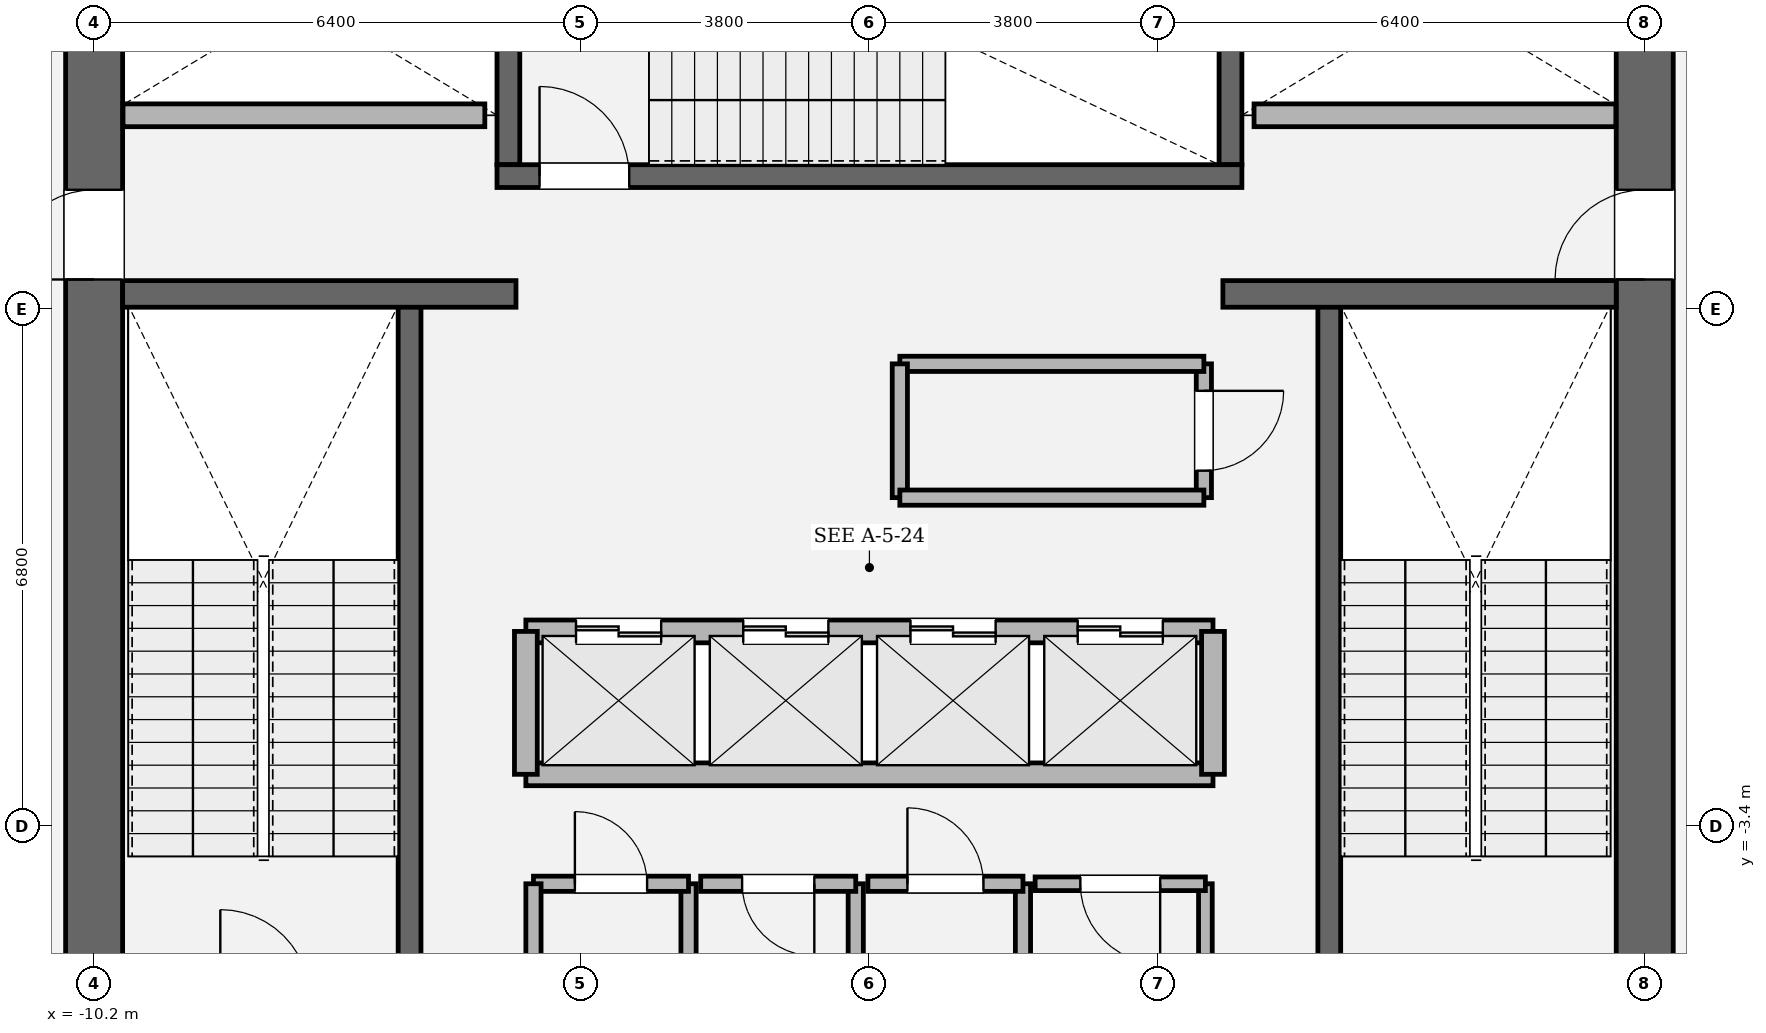
"""IFC4 building model, lengths in metres.
Left out: names, types, materials, properties, quantities, classifications, styles, units other than length and angle.
Written with IfcOpenShell. Run it as: python <this file> out.ifc"""

import sys

from ifc_helpers import new_model, si_unit, direction, frame, frame_2d, origin, place, context, subcontext, project, spatial, rectangle, extrude, element, fill, save


model = new_model("IFC4")
c1 = context("Model", 3, precision=1e-05, world=origin(), true_north=direction((0.0, 1.0)))
c2 = subcontext(c1, "Body", "Model", "MODEL_VIEW")
j1 = project(units=[si_unit("LENGTHUNIT", "METRE"), si_unit("PLANEANGLEUNIT", "RADIAN")], contexts=[c1])
p1 = place(None, origin())
s1 = spatial("IfcSite", under=j1, at=p1, CompositionType="ELEMENT")
p2 = place(p1, origin())
s2 = spatial("IfcBuilding", under=s1, at=p2, CompositionType="ELEMENT")
p3 = place(p2, frame((0.0, 0.0, 117.3)))
s3 = spatial("IfcBuildingStorey", under=s2, at=p3, CompositionType="ELEMENT", Elevation=117.3)
p4 = place(p3, frame((-10.2, -8.825, 0.0), z_axis=(0.0, 0.0, 1.0), x_axis=(0.0, 1.0, 0.0)))
e1 = element("IfcWall", 1, at=p4, inside=s3, PredefinedType="SHEAR", context=c2, shape_type="SweptSolid", body=[
    extrude(rectangle(XDim=17.65, YDim=0.75, at=frame_2d((8.825, 0.0))), origin(), (0.0, 0.0, 1.0), 4.05),
])
p5 = place(p4, frame((12.615, 0.0, 0.0)))
e2 = element("IfcOpeningElement", 2, at=p5, cuts=e1, PredefinedType="OPENING", context=c2, shape_type="SweptSolid", body=[
    extrude(rectangle(XDim=1.18, YDim=2.2, at=frame_2d((0.59, 1.1))), frame((0.0, 0.385, 0.0), z_axis=(0.0, -1.0, 0.0), x_axis=(1.0, 0.0, 0.0)), (0.0, 0.0, 1.0), 0.77),
])
p6 = place(p3, frame((10.2, 8.825, 0.0), z_axis=(0.0, 0.0, 1.0), x_axis=(0.0, -1.0, 0.0)))
e3 = element("IfcWall", 3, at=p6, inside=s3, PredefinedType="SHEAR", context=c2, shape_type="SweptSolid", body=[
    extrude(rectangle(XDim=17.65, YDim=0.75, at=frame_2d((8.825, 0.0))), origin(), (0.0, 0.0, 1.0), 4.05),
])
p7 = place(p6, frame((3.855, 0.0, 0.0)))
e4 = element("IfcOpeningElement", 4, at=p7, cuts=e3, PredefinedType="OPENING", context=c2, shape_type="SweptSolid", body=[
    extrude(rectangle(XDim=1.18, YDim=2.2, at=frame_2d((0.59, 1.1))), frame((0.0, 0.385, 0.0), z_axis=(0.0, -1.0, 0.0), x_axis=(1.0, 0.0, 0.0)), (0.0, 0.0, 1.0), 0.77),
])
for number, where, z_axis, x_axis in (
    (5, (-6.05, -5.5, 0.0), (0.0, 0.0, 1.0), (0.0, 1.0, 0.0)),
    (6, (6.05, 3.45, 0.0), (0.0, 0.0, 1.0), (0.0, -1.0, 0.0)),
):
    element("IfcWall", number, at=place(p3, frame(where, z_axis=z_axis, x_axis=x_axis)), inside=s3, PredefinedType="SOLIDWALL", context=c2, shape_type="SweptSolid", body=[
        extrude(rectangle(XDim=8.95, YDim=0.3, at=frame_2d((4.475, 0.0))), origin(), (0.0, 0.0, 1.0), 4.05),
    ])
for number, where, z_axis, x_axis in (
    (7, (-4.75, 5.3, 0.0), (0.0, 0.0, 1.0), (0.0, 1.0, 0.0)),
    (8, (4.75, 8.825, 0.0), (0.0, 0.0, 1.0), (0.0, -1.0, 0.0)),
):
    element("IfcWall", number, at=place(p3, frame(where, z_axis=z_axis, x_axis=x_axis)), inside=s3, PredefinedType="SOLIDWALL", context=c2, shape_type="SweptSolid", body=[
        extrude(rectangle(XDim=3.525, YDim=0.3, at=frame_2d((1.762, 0.0))), origin(), (0.0, 0.0, 1.0), 4.05),
    ])
p8 = place(p3, frame((-4.9, 5.15, 0.0), z_axis=(0.0, 0.0, 1.0), x_axis=(1.0, 0.0, 0.0)))
e9 = element("IfcWall", 9, at=p8, inside=s3, PredefinedType="SOLIDWALL", context=c2, shape_type="SweptSolid", body=[
    extrude(rectangle(XDim=9.8, YDim=0.3, at=frame_2d((4.9, 0.0))), origin(), (0.0, 0.0, 1.0), 4.05),
])
p9 = place(p8, frame((0.56, 0.0, 0.0)))
e10 = element("IfcOpeningElement", 10, at=p9, cuts=e9, PredefinedType="OPENING", context=c2, shape_type="SweptSolid", body=[
    extrude(rectangle(XDim=1.18, YDim=2.2, at=frame_2d((0.59, 1.1))), frame((0.0, 0.16, 0.0), z_axis=(0.0, -1.0, 0.0), x_axis=(1.0, 0.0, 0.0)), (0.0, 0.0, 1.0), 0.32),
])
for number, where, z_axis, x_axis in (
    (11, (-9.825, 3.6, 0.0), (0.0, 0.0, 1.0), (1.0, 0.0, 0.0)),
    (12, (4.65, 3.6, 0.0), (0.0, 0.0, 1.0), (1.0, 0.0, 0.0)),
):
    element("IfcWall", number, at=place(p3, frame(where, z_axis=z_axis, x_axis=x_axis)), inside=s3, PredefinedType="SOLIDWALL", context=c2, shape_type="SweptSolid", body=[
        extrude(rectangle(XDim=5.175, YDim=0.35, at=frame_2d((2.587, 0.0))), origin(), (0.0, 0.0, 1.0), 4.05),
    ])
p10 = place(p3, frame((-4.52, -0.84, 0.0), z_axis=(0.0, 0.0, 1.0), x_axis=(1.0, 0.0, 0.0)))
e13 = element("IfcWall", 13, at=p10, inside=s3, PredefinedType="SOLIDWALL", context=c2, shape_type="SweptSolid", body=[
    extrude(rectangle(XDim=9.04, YDim=0.3, at=frame_2d((4.52, 0.0))), origin(), (0.0, 0.0, 1.0), 3.81),
])
p11 = place(p10, frame((0.66, 0.0, 0.0)))
e14 = element("IfcOpeningElement", 14, at=p11, cuts=e13, PredefinedType="OPENING", context=c2, shape_type="SweptSolid", body=[
    extrude(rectangle(XDim=1.12, YDim=2.25, at=frame_2d((0.56, 1.125))), frame((0.0, 0.16, 0.0), z_axis=(0.0, -1.0, 0.0), x_axis=(1.0, 0.0, 0.0)), (0.0, 0.0, 1.0), 0.32),
])
p12 = place(p10, frame((2.86, 0.0, 0.0)))
e15 = element("IfcOpeningElement", 15, at=p12, cuts=e13, PredefinedType="OPENING", context=c2, shape_type="SweptSolid", body=[
    extrude(rectangle(XDim=1.12, YDim=2.25, at=frame_2d((0.56, 1.125))), frame((0.0, 0.16, 0.0), z_axis=(0.0, -1.0, 0.0), x_axis=(1.0, 0.0, 0.0)), (0.0, 0.0, 1.0), 0.32),
])
p13 = place(p10, frame((5.06, 0.0, 0.0)))
e16 = element("IfcOpeningElement", 16, at=p13, cuts=e13, PredefinedType="OPENING", context=c2, shape_type="SweptSolid", body=[
    extrude(rectangle(XDim=1.12, YDim=2.25, at=frame_2d((0.56, 1.125))), frame((0.0, 0.16, 0.0), z_axis=(0.0, -1.0, 0.0), x_axis=(1.0, 0.0, 0.0)), (0.0, 0.0, 1.0), 0.32),
])
p14 = place(p10, frame((7.26, 0.0, 0.0)))
e17 = element("IfcOpeningElement", 17, at=p14, cuts=e13, PredefinedType="OPENING", context=c2, shape_type="SweptSolid", body=[
    extrude(rectangle(XDim=1.12, YDim=2.25, at=frame_2d((0.56, 1.125))), frame((0.0, 0.16, 0.0), z_axis=(0.0, -1.0, 0.0), x_axis=(1.0, 0.0, 0.0)), (0.0, 0.0, 1.0), 0.32),
])
p15 = place(p3, frame((-4.52, -2.72, 0.0), z_axis=(0.0, 0.0, 1.0), x_axis=(1.0, 0.0, 0.0)))
e18 = element("IfcWall", 18, at=p15, inside=s3, PredefinedType="SOLIDWALL", context=c2, shape_type="SweptSolid", body=[
    extrude(rectangle(XDim=9.04, YDim=0.3, at=frame_2d((4.52, 0.0))), origin(), (0.0, 0.0, 1.0), 3.81),
])
for number, where, z_axis, x_axis in (
    (19, (-4.52, -2.72, 0.0), (0.0, 0.0, 1.0), (0.0, 1.0, 0.0)),
    (20, (4.52, -2.72, 0.0), (0.0, 0.0, 1.0), (0.0, 1.0, 0.0)),
):
    element("IfcWall", number, at=place(p3, frame(where, z_axis=z_axis, x_axis=x_axis)), inside=s3, PredefinedType="SOLIDWALL", context=c2, shape_type="SweptSolid", body=[
        extrude(rectangle(XDim=1.88, YDim=0.3, at=frame_2d((0.94, 0.0))), origin(), (0.0, 0.0, 1.0), 3.81),
    ])
for number, where, z_axis, x_axis in (
    (21, (-9.82, 5.95, 0.0), (0.0, 0.0, 1.0), (1.0, 0.0, 0.0)),
    (22, (5.06, 5.95, 0.0), (0.0, 0.0, 1.0), (1.0, 0.0, 0.0)),
):
    element("IfcWall", number, at=place(p3, frame(where, z_axis=z_axis, x_axis=x_axis)), inside=s3, PredefinedType="SOLIDWALL", context=c2, shape_type="SweptSolid", body=[
        extrude(rectangle(XDim=4.76, YDim=0.3, at=frame_2d((2.38, 0.0))), origin(), (0.0, 0.0, 1.0), 3.81),
    ])
p16 = place(p3, frame((-2.38, -5.9, 0.0), z_axis=(0.0, 0.0, 1.0), x_axis=(0.0, 1.0, 0.0)))
e23 = element("IfcWall", 23, at=p16, inside=s3, PredefinedType="SOLIDWALL", context=c2, shape_type="SweptSolid", body=[
    extrude(rectangle(XDim=1.74, YDim=0.2, at=frame_2d((0.87, 0.0))), origin(), (0.0, 0.0, 1.0), 3.81),
])
p17 = place(p3, frame((-2.38, -4.16, 0.0), z_axis=(0.0, 0.0, 1.0), x_axis=(-1.0, 0.0, 0.0)))
e24 = element("IfcWall", 24, at=p17, inside=s3, PredefinedType="SOLIDWALL", context=c2, shape_type="SweptSolid", body=[
    extrude(rectangle(XDim=2.04, YDim=0.2, at=frame_2d((1.02, 0.0))), origin(), (0.0, 0.0, 1.0), 3.81),
])
p18 = place(p17, frame((0.545, 0.0, 0.0)))
e25 = element("IfcOpeningElement", 25, at=p18, cuts=e24, PredefinedType="OPENING", context=c2, shape_type="SweptSolid", body=[
    extrude(rectangle(XDim=0.95, YDim=2.15, at=frame_2d((0.475, 1.075))), frame((0.0, 0.11, 0.0), z_axis=(0.0, -1.0, 0.0), x_axis=(1.0, 0.0, 0.0)), (0.0, 0.0, 1.0), 0.22),
])
for number, where, z_axis, x_axis in (
    (26, (-4.42, -4.16, 0.0), (0.0, 0.0, 1.0), (0.0, -1.0, 0.0)),
    (27, (-0.18, -5.9, 0.0), (0.0, 0.0, 1.0), (0.0, 1.0, 0.0)),
):
    element("IfcWall", number, at=place(p3, frame(where, z_axis=z_axis, x_axis=x_axis)), inside=s3, PredefinedType="SOLIDWALL", context=c2, shape_type="SweptSolid", body=[
        extrude(rectangle(XDim=1.74, YDim=0.2, at=frame_2d((0.87, 0.0))), origin(), (0.0, 0.0, 1.0), 3.81),
    ])
p19 = place(p3, frame((-0.18, -4.16, 0.0), z_axis=(0.0, 0.0, 1.0), x_axis=(-1.0, 0.0, 0.0)))
e28 = element("IfcWall", 28, at=p19, inside=s3, PredefinedType="SOLIDWALL", context=c2, shape_type="SweptSolid", body=[
    extrude(rectangle(XDim=2.04, YDim=0.2, at=frame_2d((1.02, 0.0))), origin(), (0.0, 0.0, 1.0), 3.81),
])
p20 = place(p19, frame((0.545, 0.0, 0.0)))
e29 = element("IfcOpeningElement", 29, at=p20, cuts=e28, PredefinedType="OPENING", context=c2, shape_type="SweptSolid", body=[
    extrude(rectangle(XDim=0.95, YDim=2.15, at=frame_2d((0.475, 1.075))), frame((0.0, 0.11, 0.0), z_axis=(0.0, -1.0, 0.0), x_axis=(1.0, 0.0, 0.0)), (0.0, 0.0, 1.0), 0.22),
])
p21 = place(p3, frame((2.02, -5.9, 0.0), z_axis=(0.0, 0.0, 1.0), x_axis=(0.0, 1.0, 0.0)))
e30 = element("IfcWall", 30, at=p21, inside=s3, PredefinedType="SOLIDWALL", context=c2, shape_type="SweptSolid", body=[
    extrude(rectangle(XDim=1.74, YDim=0.2, at=frame_2d((0.87, 0.0))), origin(), (0.0, 0.0, 1.0), 3.81),
])
p22 = place(p3, frame((2.02, -4.16, 0.0), z_axis=(0.0, 0.0, 1.0), x_axis=(-1.0, 0.0, 0.0)))
e31 = element("IfcWall", 31, at=p22, inside=s3, PredefinedType="SOLIDWALL", context=c2, shape_type="SweptSolid", body=[
    extrude(rectangle(XDim=2.04, YDim=0.2, at=frame_2d((1.02, 0.0))), origin(), (0.0, 0.0, 1.0), 3.81),
])
p23 = place(p22, frame((0.52, 0.0, 0.0)))
e32 = element("IfcOpeningElement", 32, at=p23, cuts=e31, PredefinedType="OPENING", context=c2, shape_type="SweptSolid", body=[
    extrude(rectangle(XDim=1.0, YDim=2.15, at=frame_2d((0.5, 1.075))), frame((0.0, 0.11, 0.0), z_axis=(0.0, -1.0, 0.0), x_axis=(1.0, 0.0, 0.0)), (0.0, 0.0, 1.0), 0.22),
])
p24 = place(p3, frame((4.42, -5.9, 0.0), z_axis=(0.0, 0.0, 1.0), x_axis=(0.0, 1.0, 0.0)))
e33 = element("IfcWall", 33, at=p24, inside=s3, PredefinedType="PARTITIONING", context=c2, shape_type="SweptSolid", body=[
    extrude(rectangle(XDim=1.74, YDim=0.18, at=frame_2d((0.87, 0.0))), origin(), (0.0, 0.0, 1.0), 3.81),
])
p25 = place(p3, frame((4.42, -4.16, 0.0), z_axis=(0.0, 0.0, 1.0), x_axis=(-1.0, 0.0, 0.0)))
e34 = element("IfcWall", 34, at=p25, inside=s3, PredefinedType="PARTITIONING", context=c2, shape_type="SweptSolid", body=[
    extrude(rectangle(XDim=2.24, YDim=0.18, at=frame_2d((1.12, 0.0))), origin(), (0.0, 0.0, 1.0), 3.81),
])
p26 = place(p25, frame((0.595, 0.0, 0.0)))
e35 = element("IfcOpeningElement", 35, at=p26, cuts=e34, PredefinedType="OPENING", context=c2, shape_type="SweptSolid", body=[
    extrude(rectangle(XDim=1.05, YDim=2.2, at=frame_2d((0.525, 1.1))), frame((0.0, 0.1, 0.0), z_axis=(0.0, -1.0, 0.0), x_axis=(1.0, 0.0, 0.0)), (0.0, 0.0, 1.0), 0.2),
])
p27 = place(p3, frame((4.4, 0.92, 0.0), z_axis=(0.0, 0.0, 1.0), x_axis=(0.0, 1.0, 0.0)))
e36 = element("IfcWall", 36, at=p27, inside=s3, PredefinedType="SOLIDWALL", context=c2, shape_type="SweptSolid", body=[
    extrude(rectangle(XDim=1.76, YDim=0.2, at=frame_2d((0.88, 0.0))), origin(), (0.0, 0.0, 1.0), 3.81),
])
p28 = place(p27, frame((0.355, 0.0, 0.0)))
e37 = element("IfcOpeningElement", 37, at=p28, cuts=e36, PredefinedType="OPENING", context=c2, shape_type="SweptSolid", body=[
    extrude(rectangle(XDim=1.05, YDim=2.2, at=frame_2d((0.525, 1.1))), frame((0.0, 0.11, 0.0), z_axis=(0.0, -1.0, 0.0), x_axis=(1.0, 0.0, 0.0)), (0.0, 0.0, 1.0), 0.22),
])
p29 = place(p3, frame((4.4, 2.68, 0.0), z_axis=(0.0, 0.0, 1.0), x_axis=(-1.0, 0.0, 0.0)))
e38 = element("IfcWall", 38, at=p29, inside=s3, PredefinedType="SOLIDWALL", context=c2, shape_type="SweptSolid", body=[
    extrude(rectangle(XDim=4.0, YDim=0.2, at=frame_2d((2.0, 0.0))), origin(), (0.0, 0.0, 1.0), 3.81),
])
p30 = place(p3, frame((0.4, 2.68, 0.0), z_axis=(0.0, 0.0, 1.0), x_axis=(0.0, -1.0, 0.0)))
e39 = element("IfcWall", 39, at=p30, inside=s3, PredefinedType="SOLIDWALL", context=c2, shape_type="SweptSolid", body=[
    extrude(rectangle(XDim=1.76, YDim=0.2, at=frame_2d((0.88, 0.0))), origin(), (0.0, 0.0, 1.0), 3.81),
])
p31 = place(p3, frame((0.4, 0.92, 0.0), z_axis=(0.0, 0.0, 1.0), x_axis=(1.0, 0.0, 0.0)))
e40 = element("IfcWall", 40, at=p31, inside=s3, PredefinedType="SOLIDWALL", context=c2, shape_type="SweptSolid", body=[
    extrude(rectangle(XDim=4.0, YDim=0.2, at=frame_2d((2.0, 0.0))), origin(), (0.0, 0.0, 1.0), 3.81),
])
p32 = place(p9, origin())
e41 = element("IfcDoor", 41, at=p32, inside=s3, OperationType="SINGLE_SWING_LEFT", PredefinedType="DOOR", context=c2, shape_type="SweptSolid", body=[
    extrude(rectangle(XDim=1.18, YDim=2.2, at=frame_2d((0.59, 1.1))), frame((0.0, 0.025, 0.0), z_axis=(0.0, -1.0, 0.0), x_axis=(1.0, 0.0, 0.0)), (0.0, 0.0, 1.0), 0.05),
])
fill(e10, e41)
p33 = place(p5, origin())
e42 = element("IfcDoor", 42, at=p33, inside=s3, OperationType="SINGLE_SWING_LEFT", PredefinedType="DOOR", context=c2, shape_type="SweptSolid", body=[
    extrude(rectangle(XDim=1.18, YDim=2.2, at=frame_2d((0.59, 1.1))), frame((0.0, 0.025, 0.0), z_axis=(0.0, -1.0, 0.0), x_axis=(1.0, 0.0, 0.0)), (0.0, 0.0, 1.0), 0.05),
])
fill(e2, e42)
p34 = place(p7, origin())
e43 = element("IfcDoor", 43, at=p34, inside=s3, OperationType="SINGLE_SWING_RIGHT", PredefinedType="DOOR", context=c2, shape_type="SweptSolid", body=[
    extrude(rectangle(XDim=1.18, YDim=2.2, at=frame_2d((0.59, 1.1))), frame((0.0, 0.025, 0.0), z_axis=(0.0, -1.0, 0.0), x_axis=(1.0, 0.0, 0.0)), (0.0, 0.0, 1.0), 0.05),
])
fill(e4, e43)
p35 = place(p11, origin())
e44 = element("IfcDoor", 44, at=p35, inside=s3, OperationType="DOUBLE_DOOR_SLIDING", PredefinedType="DOOR", context=c2, shape_type="SweptSolid", body=[
    extrude(rectangle(XDim=1.12, YDim=2.25, at=frame_2d((0.56, 1.125))), frame((0.0, 0.025, 0.0), z_axis=(0.0, -1.0, 0.0), x_axis=(1.0, 0.0, 0.0)), (0.0, 0.0, 1.0), 0.05),
])
fill(e14, e44)
p36 = place(p12, origin())
e45 = element("IfcDoor", 45, at=p36, inside=s3, OperationType="DOUBLE_DOOR_SLIDING", PredefinedType="DOOR", context=c2, shape_type="SweptSolid", body=[
    extrude(rectangle(XDim=1.12, YDim=2.25, at=frame_2d((0.56, 1.125))), frame((0.0, 0.025, 0.0), z_axis=(0.0, -1.0, 0.0), x_axis=(1.0, 0.0, 0.0)), (0.0, 0.0, 1.0), 0.05),
])
fill(e15, e45)
p37 = place(p13, origin())
e46 = element("IfcDoor", 46, at=p37, inside=s3, OperationType="DOUBLE_DOOR_SLIDING", PredefinedType="DOOR", context=c2, shape_type="SweptSolid", body=[
    extrude(rectangle(XDim=1.12, YDim=2.25, at=frame_2d((0.56, 1.125))), frame((0.0, 0.025, 0.0), z_axis=(0.0, -1.0, 0.0), x_axis=(1.0, 0.0, 0.0)), (0.0, 0.0, 1.0), 0.05),
])
fill(e16, e46)
p38 = place(p14, origin())
e47 = element("IfcDoor", 47, at=p38, inside=s3, OperationType="DOUBLE_DOOR_SLIDING", PredefinedType="DOOR", context=c2, shape_type="SweptSolid", body=[
    extrude(rectangle(XDim=1.12, YDim=2.25, at=frame_2d((0.56, 1.125))), frame((0.0, 0.025, 0.0), z_axis=(0.0, -1.0, 0.0), x_axis=(1.0, 0.0, 0.0)), (0.0, 0.0, 1.0), 0.05),
])
fill(e17, e47)
p39 = place(p18, origin())
e48 = element("IfcDoor", 48, at=p39, inside=s3, OperationType="SINGLE_SWING_RIGHT", PredefinedType="DOOR", context=c2, shape_type="SweptSolid", body=[
    extrude(rectangle(XDim=0.95, YDim=2.15, at=frame_2d((0.475, 1.075))), frame((0.0, 0.025, 0.0), z_axis=(0.0, -1.0, 0.0), x_axis=(1.0, 0.0, 0.0)), (0.0, 0.0, 1.0), 0.05),
])
fill(e25, e48)
p40 = place(p20, origin())
e49 = element("IfcDoor", 49, at=p40, inside=s3, OperationType="SINGLE_SWING_LEFT", PredefinedType="DOOR", context=c2, shape_type="SweptSolid", body=[
    extrude(rectangle(XDim=0.95, YDim=2.15, at=frame_2d((0.475, 1.075))), frame((0.0, 0.025, 0.0), z_axis=(0.0, -1.0, 0.0), x_axis=(1.0, 0.0, 0.0)), (0.0, 0.0, 1.0), 0.05),
])
fill(e29, e49)
p41 = place(p23, origin())
e50 = element("IfcDoor", 50, at=p41, inside=s3, OperationType="SINGLE_SWING_RIGHT", PredefinedType="DOOR", context=c2, shape_type="SweptSolid", body=[
    extrude(rectangle(XDim=1.0, YDim=2.15, at=frame_2d((0.5, 1.075))), frame((0.0, 0.025, 0.0), z_axis=(0.0, -1.0, 0.0), x_axis=(1.0, 0.0, 0.0)), (0.0, 0.0, 1.0), 0.05),
])
fill(e32, e50)
p42 = place(p26, origin())
e51 = element("IfcDoor", 51, at=p42, inside=s3, OperationType="SINGLE_SWING_LEFT", PredefinedType="DOOR", context=c2, shape_type="SweptSolid", body=[
    extrude(rectangle(XDim=1.05, YDim=2.2, at=frame_2d((0.525, 1.1))), frame((0.0, 0.025, 0.0), z_axis=(0.0, -1.0, 0.0), x_axis=(1.0, 0.0, 0.0)), (0.0, 0.0, 1.0), 0.05),
])
fill(e35, e51)
p43 = place(p28, origin())
e52 = element("IfcDoor", 52, at=p43, inside=s3, OperationType="SINGLE_SWING_RIGHT", PredefinedType="DOOR", context=c2, shape_type="SweptSolid", body=[
    extrude(rectangle(XDim=1.05, YDim=2.2, at=frame_2d((0.525, 1.1))), frame((0.0, 0.025, 0.0), z_axis=(0.0, -1.0, 0.0), x_axis=(1.0, 0.0, 0.0)), (0.0, 0.0, 1.0), 0.05),
])
fill(e37, e52)
save(model, sys.argv[1])
